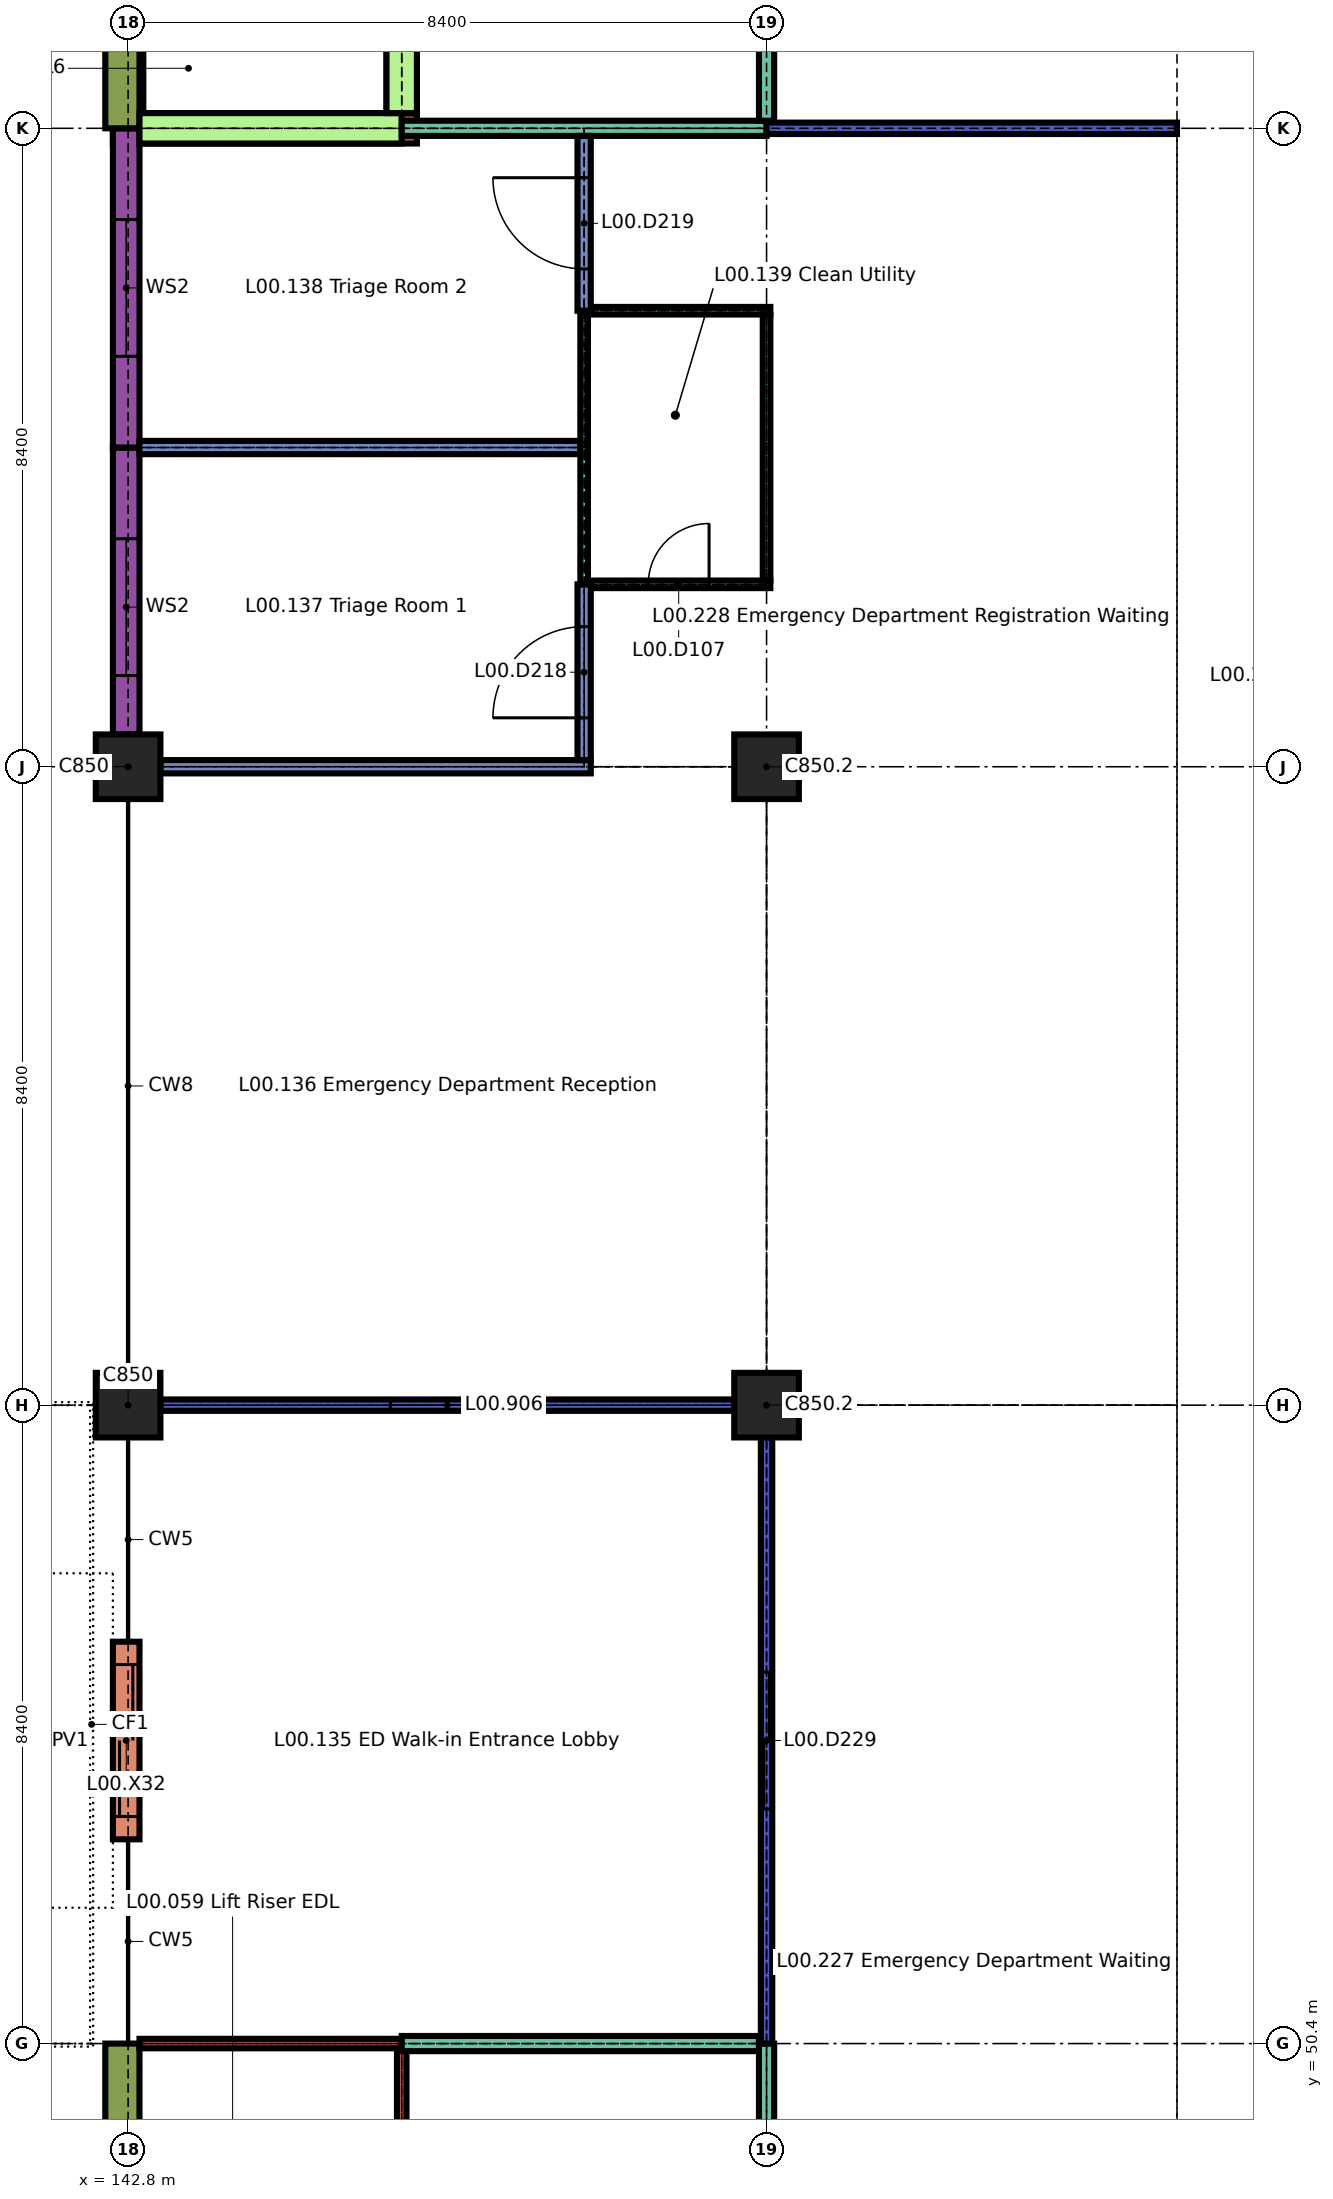
"""IFC4 building model, lengths in metres.
Left out: names, types, materials, properties, quantities, classifications, styles, units other than length and angle.
Written with IfcOpenShell. Run it as: python <this file> out.ifc"""

import sys

from ifc_helpers import new_model, si_unit, direction, frame, frame_2d, origin, origin_2d, place, context, subcontext, project, spatial, rectangle, extrude, element, fill, save


model = new_model("IFC4")
c1 = context("Model", 3, precision=1e-05, world=origin(), true_north=direction((0.0, 1.0)))
c2 = subcontext(c1, "Body", "Model", "MODEL_VIEW")
j1 = project(units=[si_unit("LENGTHUNIT", "METRE"), si_unit("PLANEANGLEUNIT", "RADIAN")], contexts=[c1])
p1 = place(None, origin())
s1 = spatial("IfcSite", under=j1, at=p1, CompositionType="ELEMENT")
p2 = place(p1, origin())
s2 = spatial("IfcBuilding", under=s1, at=p2, CompositionType="ELEMENT")
p3 = place(p2, origin())
s3 = spatial("IfcBuildingStorey", under=s2, at=p3, CompositionType="ELEMENT", Elevation=0.0)
p4 = place(p3, frame((142.6, 75.6, -1.4), z_axis=(0.0, 0.0, 1.0), x_axis=(1.0, 0.0, 0.0)))
e1 = element("IfcWall", 1, at=p4, inside=s3, PredefinedType="SOLIDWALL", context=c2, shape_type="SweptSolid", body=[
    extrude(rectangle(XDim=4.0, YDim=0.4, at=frame_2d((2.0, 0.0))), origin(), (0.0, 0.0, 1.0), 0.95),
])
for number, where, z_axis, x_axis in (
    (2, (142.8, 75.8, -1.4), (0.0, 0.0, 1.0), (0.0, 1.0, 0.0)),
    (3, (146.4, 75.8, -1.4), (0.0, 0.0, 1.0), (0.0, 1.0, 0.0)),
):
    element("IfcWall", number, at=place(p3, frame(where, z_axis=z_axis, x_axis=x_axis)), inside=s3, PredefinedType="SOLIDWALL", context=c2, shape_type="SweptSolid", body=[
        extrude(rectangle(XDim=8.0, YDim=0.4, at=frame_2d((4.0, 0.0))), origin(), (0.0, 0.0, 1.0), 0.95),
    ])
for number, where, z_axis, x_axis in (
    (4, (142.8, 58.8, 0.0), (0.0, 0.0, 1.0), (1.0, 0.0, 0.0)),
    (5, (151.2, 58.8, 0.0), (0.0, 0.0, 1.0), (1.0, 0.0, 0.0)),
    (6, (142.8, 67.2, 0.0), (0.0, 0.0, 1.0), (1.0, 0.0, 0.0)),
    (7, (151.2, 67.2, 0.0), (0.0, 0.0, 1.0), (1.0, 0.0, 0.0)),
):
    element("IfcColumn", number, at=place(p3, frame(where, z_axis=z_axis, x_axis=x_axis)), inside=s3, PredefinedType="COLUMN", context=c2, shape_type="SweptSolid", body=[
        extrude(rectangle(XDim=0.85, YDim=0.85, at=origin_2d()), origin(), (0.0, 0.0, 1.0), 4.14),
    ])
p5 = place(p3, frame((142.725, 46.2, 0.0), z_axis=(0.0, 0.0, 1.0), x_axis=(0.0, 1.0, 0.0)))
e8 = element("IfcWall", 8, at=p5, inside=s3, PredefinedType="SOLIDWALL", context=c2, shape_type="SweptSolid", body=[
    extrude(rectangle(XDim=4.2, YDim=0.45, at=frame_2d((2.1, 0.0))), origin(), (0.0, 0.0, 1.0), 4.14),
])
p6 = place(p3, frame((142.775, 53.087, 0.0), z_axis=(0.0, 0.0, 1.0), x_axis=(0.0, 1.0, 0.0)))
e9 = element("IfcWall", 9, at=p6, inside=s3, PredefinedType="SOLIDWALL", context=c2, shape_type="SweptSolid", body=[
    extrude(rectangle(XDim=2.6, YDim=0.35, at=frame_2d((1.3, 0.0))), origin(), (0.0, 0.0, 1.0), 4.14),
])
p7 = place(p6, frame((0.3, 0.0, 0.0)))
e10 = element("IfcOpeningElement", 10, at=p7, cuts=e9, PredefinedType="OPENING", context=c2, shape_type="SweptSolid", body=[
    extrude(rectangle(XDim=2.0, YDim=3.0, at=frame_2d((1.0, 1.5))), frame((0.0, 0.185, 0.0), z_axis=(0.0, -1.0, 0.0), x_axis=(1.0, 0.0, 0.0)), (0.0, 0.0, 1.0), 0.37),
])
p8 = place(p3, frame((142.775, 67.625, 0.0), z_axis=(0.0, 0.0, 1.0), x_axis=(0.0, 1.0, 0.0)))
e11 = element("IfcWall", 11, at=p8, inside=s3, PredefinedType="SOLIDWALL", context=c2, shape_type="SweptSolid", body=[
    extrude(rectangle(XDim=3.775, YDim=0.35, at=frame_2d((1.887, 0.0))), origin(), (0.0, 0.0, 1.0), 3.84),
])
p9 = place(p8, frame((0.775, 0.0, 0.9)))
e12 = element("IfcOpeningElement", 12, at=p9, cuts=e11, PredefinedType="OPENING", context=c2, shape_type="SweptSolid", body=[
    extrude(rectangle(XDim=1.8, YDim=2.1, at=frame_2d((0.9, 1.05))), frame((0.0, 0.185, 0.0), z_axis=(0.0, -1.0, 0.0), x_axis=(1.0, 0.0, 0.0)), (0.0, 0.0, 1.0), 0.37),
])
p10 = place(p3, frame((142.775, 71.4, 0.0), z_axis=(0.0, 0.0, 1.0), x_axis=(0.0, 1.0, 0.0)))
e13 = element("IfcWall", 13, at=p10, inside=s3, PredefinedType="SOLIDWALL", context=c2, shape_type="SweptSolid", body=[
    extrude(rectangle(XDim=4.2, YDim=0.35, at=frame_2d((2.1, 0.0))), origin(), (0.0, 0.0, 1.0), 3.84),
])
p11 = place(p10, frame((1.2, 0.0, 0.9)))
e14 = element("IfcOpeningElement", 14, at=p11, cuts=e13, PredefinedType="OPENING", context=c2, shape_type="SweptSolid", body=[
    extrude(rectangle(XDim=1.8, YDim=2.1, at=frame_2d((0.9, 1.05))), frame((0.0, 0.185, 0.0), z_axis=(0.0, -1.0, 0.0), x_axis=(1.0, 0.0, 0.0)), (0.0, 0.0, 1.0), 0.37),
])
p12 = place(p3, frame((142.725, 75.6, 0.0), z_axis=(0.0, 0.0, 1.0), x_axis=(0.0, 1.0, 0.0)))
e15 = element("IfcWall", 15, at=p12, inside=s3, PredefinedType="SOLIDWALL", context=c2, shape_type="SweptSolid", body=[
    extrude(rectangle(XDim=4.2, YDim=0.45, at=frame_2d((2.1, 0.0))), origin(), (0.0, 0.0, 1.0), 4.14),
])
p13 = place(p3, frame((142.95, 50.4, 0.0), z_axis=(0.0, 0.0, 1.0), x_axis=(1.0, 0.0, 0.0)))
e16 = element("IfcWall", 16, at=p13, inside=s3, PredefinedType="SOLIDWALL", context=c2, shape_type="SweptSolid", body=[
    extrude(rectangle(XDim=3.45, YDim=0.125, at=frame_2d((1.725, 0.0))), origin(), (0.0, 0.0, 1.0), 4.14),
])
p14 = place(p3, frame((146.4, 50.4, 0.0), z_axis=(0.0, 0.0, 1.0), x_axis=(1.0, 0.0, 0.0)))
e17 = element("IfcWall", 17, at=p14, inside=s3, PredefinedType="PARTITIONING", context=c2, shape_type="SweptSolid", body=[
    extrude(rectangle(XDim=4.7, YDim=0.2, at=frame_2d((2.35, 0.0))), origin(), (0.0, 0.0, 1.0), 4.14),
])
p15 = place(p3, frame((143.225, 58.8, 0.0), z_axis=(0.0, 0.0, 1.0), x_axis=(1.0, 0.0, 0.0)))
e18 = element("IfcWall", 18, at=p15, inside=s3, PredefinedType="PARTITIONING", context=c2, shape_type="SweptSolid", body=[
    extrude(rectangle(XDim=7.55, YDim=0.15, at=frame_2d((3.775, 0.0))), origin(), (0.0, 0.0, 1.0), 4.14),
])
p16 = place(p15, frame((3.025, 0.0, 0.9)))
e19 = element("IfcOpeningElement", 19, at=p16, cuts=e18, PredefinedType="OPENING", context=c2, shape_type="SweptSolid", body=[
    extrude(rectangle(XDim=1.5, YDim=1.0, at=frame_2d((0.75, 0.5))), frame((0.0, 0.085, 0.0), z_axis=(0.0, -1.0, 0.0), x_axis=(1.0, 0.0, 0.0)), (0.0, 0.0, 1.0), 0.17),
])
p17 = place(p3, frame((143.225, 67.2, 0.0), z_axis=(0.0, 0.0, 1.0), x_axis=(1.0, 0.0, 0.0)))
e20 = element("IfcWall", 20, at=p17, inside=s3, PredefinedType="PARTITIONING", context=c2, shape_type="SweptSolid", body=[
    extrude(rectangle(XDim=5.662, YDim=0.175, at=frame_2d((2.831, 0.0))), origin(), (0.0, 0.0, 1.0), 4.14),
])
p18 = place(p3, frame((148.887, 69.6, 0.0), z_axis=(0.0, 0.0, 1.0), x_axis=(1.0, 0.0, 0.0)))
e21 = element("IfcWall", 21, at=p18, inside=s3, PredefinedType="PARTITIONING", context=c2, shape_type="SweptSolid", body=[
    extrude(rectangle(XDim=2.363, YDim=0.1, at=frame_2d((1.181, 0.0))), origin(), (0.0, 0.0, 1.0), 4.14),
])
p19 = place(p18, frame((0.756, 0.0, 0.0)))
e22 = element("IfcOpeningElement", 22, at=p19, cuts=e21, PredefinedType="OPENING", context=c2, shape_type="SweptSolid", body=[
    extrude(rectangle(XDim=0.8, YDim=2.1, at=frame_2d((0.4, 1.05))), frame((0.0, 0.06, 0.0), z_axis=(0.0, -1.0, 0.0), x_axis=(1.0, 0.0, 0.0)), (0.0, 0.0, 1.0), 0.12),
])
p20 = place(p3, frame((142.95, 71.4, 0.0), z_axis=(0.0, 0.0, 1.0), x_axis=(1.0, 0.0, 0.0)))
e23 = element("IfcWall", 23, at=p20, inside=s3, PredefinedType="PARTITIONING", context=c2, shape_type="SweptSolid", body=[
    extrude(rectangle(XDim=5.8, YDim=0.175, at=frame_2d((2.9, 0.0))), origin(), (0.0, 0.0, 1.0), 4.14),
])
p21 = place(p3, frame((148.887, 73.2, 0.0), z_axis=(0.0, 0.0, 1.0), x_axis=(1.0, 0.0, 0.0)))
e24 = element("IfcWall", 24, at=p21, inside=s3, PredefinedType="PARTITIONING", context=c2, shape_type="SweptSolid", body=[
    extrude(rectangle(XDim=2.363, YDim=0.1, at=frame_2d((1.181, 0.0))), origin(), (0.0, 0.0, 1.0), 4.14),
])
p22 = place(p3, frame((142.95, 75.6, 0.0), z_axis=(0.0, 0.0, 1.0), x_axis=(1.0, 0.0, 0.0)))
e25 = element("IfcWall", 25, at=p22, inside=s3, PredefinedType="SHEAR", context=c2, shape_type="SweptSolid", body=[
    extrude(rectangle(XDim=3.45, YDim=0.4, at=frame_2d((1.725, 0.0))), origin(), (0.0, 0.0, 1.0), 4.14),
])
p23 = place(p3, frame((146.4, 75.6, 0.0), z_axis=(0.0, 0.0, 1.0), x_axis=(1.0, 0.0, 0.0)))
e26 = element("IfcWall", 26, at=p23, inside=s3, PredefinedType="PARTITIONING", context=c2, shape_type="SweptSolid", body=[
    extrude(rectangle(XDim=4.8, YDim=0.2, at=frame_2d((2.4, 0.0))), origin(), (0.0, 0.0, 1.0), 4.14),
])
p24 = place(p3, frame((151.2, 75.6, 0.0), z_axis=(0.0, 0.0, 1.0), x_axis=(1.0, 0.0, 0.0)))
e27 = element("IfcWall", 27, at=p24, inside=s3, PredefinedType="PARTITIONING", context=c2, shape_type="SweptSolid", body=[
    extrude(rectangle(XDim=5.4, YDim=0.15, at=frame_2d((2.7, 0.0))), origin(), (0.0, 0.0, 1.0), 4.14),
])
p25 = place(p3, frame((146.4, 46.2, 0.0), z_axis=(0.0, 0.0, 1.0), x_axis=(0.0, 1.0, 0.0)))
e28 = element("IfcWall", 28, at=p25, inside=s3, PredefinedType="SOLIDWALL", context=c2, shape_type="SweptSolid", body=[
    extrude(rectangle(XDim=4.1, YDim=0.125, at=frame_2d((2.05, 0.0))), origin(), (0.0, 0.0, 1.0), 4.14),
])
p26 = place(p25, frame((1.65, 0.0, 0.0)))
e29 = element("IfcOpeningElement", 29, at=p26, cuts=e28, PredefinedType="OPENING", context=c2, shape_type="SweptSolid", body=[
    extrude(rectangle(XDim=0.8, YDim=2.1, at=frame_2d((0.4, 1.05))), frame((0.0, 0.073, 0.0), z_axis=(0.0, -1.0, 0.0), x_axis=(1.0, 0.0, 0.0)), (0.0, 0.0, 1.0), 0.145),
])
p27 = place(p3, frame((146.4, 75.8, 0.0), z_axis=(0.0, 0.0, 1.0), x_axis=(0.0, 1.0, 0.0)))
e30 = element("IfcWall", 30, at=p27, inside=s3, PredefinedType="SHEAR", context=c2, shape_type="SweptSolid", body=[
    extrude(rectangle(XDim=8.0, YDim=0.4, at=frame_2d((4.0, 0.0))), origin(), (0.0, 0.0, 1.0), 4.14),
])
p28 = place(p27, frame((1.35, 0.0, 0.0)))
e31 = element("IfcOpeningElement", 31, at=p28, cuts=e30, PredefinedType="OPENING", context=c2, shape_type="SweptSolid", body=[
    extrude(rectangle(XDim=1.3, YDim=2.1, at=frame_2d((0.65, 1.05))), frame((0.0, 0.21, 0.0), z_axis=(0.0, -1.0, 0.0), x_axis=(1.0, 0.0, 0.0)), (0.0, 0.0, 1.0), 0.42),
])
p29 = place(p27, frame((5.45, 0.0, 0.0)))
e32 = element("IfcOpeningElement", 32, at=p29, cuts=e30, PredefinedType="OPENING", context=c2, shape_type="SweptSolid", body=[
    extrude(rectangle(XDim=1.1, YDim=2.1, at=frame_2d((0.55, 1.05))), frame((0.0, 0.21, 0.0), z_axis=(0.0, -1.0, 0.0), x_axis=(1.0, 0.0, 0.0)), (0.0, 0.0, 1.0), 0.42),
])
p30 = place(p3, frame((148.8, 67.288, 0.0), z_axis=(0.0, 0.0, 1.0), x_axis=(0.0, 1.0, 0.0)))
e33 = element("IfcWall", 33, at=p30, inside=s3, PredefinedType="PARTITIONING", context=c2, shape_type="SweptSolid", body=[
    extrude(rectangle(XDim=2.312, YDim=0.175, at=frame_2d((1.156, 0.0))), origin(), (0.0, 0.0, 1.0), 4.14),
])
p31 = place(p30, frame((0.556, 0.0, 0.0)))
e34 = element("IfcOpeningElement", 34, at=p31, cuts=e33, PredefinedType="OPENING", context=c2, shape_type="SweptSolid", body=[
    extrude(rectangle(XDim=1.2, YDim=2.1, at=frame_2d((0.6, 1.05))), frame((0.0, 0.097, 0.0), z_axis=(0.0, -1.0, 0.0), x_axis=(1.0, 0.0, 0.0)), (0.0, 0.0, 1.0), 0.195),
])
p32 = place(p3, frame((148.8, 69.6, 0.0), z_axis=(0.0, 0.0, 1.0), x_axis=(0.0, 1.0, 0.0)))
e35 = element("IfcWall", 35, at=p32, inside=s3, PredefinedType="PARTITIONING", context=c2, shape_type="SweptSolid", body=[
    extrude(rectangle(XDim=3.6, YDim=0.1, at=frame_2d((1.8, 0.0))), origin(), (0.0, 0.0, 1.0), 4.14),
])
p33 = place(p3, frame((148.8, 73.2, 0.0), z_axis=(0.0, 0.0, 1.0), x_axis=(0.0, 1.0, 0.0)))
e36 = element("IfcWall", 36, at=p33, inside=s3, PredefinedType="PARTITIONING", context=c2, shape_type="SweptSolid", body=[
    extrude(rectangle(XDim=2.3, YDim=0.175, at=frame_2d((1.15, 0.0))), origin(), (0.0, 0.0, 1.0), 4.14),
])
p34 = place(p33, frame((0.55, 0.0, 0.0)))
e37 = element("IfcOpeningElement", 37, at=p34, cuts=e36, PredefinedType="OPENING", context=c2, shape_type="SweptSolid", body=[
    extrude(rectangle(XDim=1.2, YDim=2.1, at=frame_2d((0.6, 1.05))), frame((0.0, 0.097, 0.0), z_axis=(0.0, -1.0, 0.0), x_axis=(1.0, 0.0, 0.0)), (0.0, 0.0, 1.0), 0.195),
])
p35 = place(p3, frame((151.2, 42.0, 0.0), z_axis=(0.0, 0.0, 1.0), x_axis=(0.0, 1.0, 0.0)))
e38 = element("IfcWall", 38, at=p35, inside=s3, PredefinedType="PARTITIONING", context=c2, shape_type="SweptSolid", body=[
    extrude(rectangle(XDim=8.4, YDim=0.2, at=frame_2d((4.2, 0.0))), origin(), (0.0, 0.0, 1.0), 4.14),
])
p36 = place(p35, frame((3.35, 0.0, 0.0)))
e39 = element("IfcOpeningElement", 39, at=p36, cuts=e38, PredefinedType="OPENING", context=c2, shape_type="SweptSolid", body=[
    extrude(rectangle(XDim=1.7, YDim=2.4, at=frame_2d((0.85, 1.2))), frame((0.0, 0.11, 0.0), z_axis=(0.0, -1.0, 0.0), x_axis=(1.0, 0.0, 0.0)), (0.0, 0.0, 1.0), 0.22),
])
p37 = place(p3, frame((151.2, 50.4, 0.0), z_axis=(0.0, 0.0, 1.0), x_axis=(0.0, 1.0, 0.0)))
e40 = element("IfcWall", 40, at=p37, inside=s3, PredefinedType="PARTITIONING", context=c2, shape_type="SweptSolid", body=[
    extrude(rectangle(XDim=7.975, YDim=0.15, at=frame_2d((3.988, 0.0))), origin(), (0.0, 0.0, 1.0), 4.14),
])
p38 = place(p37, frame((3.087, 0.0, 0.0)))
e41 = element("IfcOpeningElement", 41, at=p38, cuts=e40, PredefinedType="OPENING", context=c2, shape_type="SweptSolid", body=[
    extrude(rectangle(XDim=1.8, YDim=2.4, at=frame_2d((0.9, 1.2))), frame((0.0, 0.085, 0.0), z_axis=(0.0, -1.0, 0.0), x_axis=(1.0, 0.0, 0.0)), (0.0, 0.0, 1.0), 0.17),
])
p39 = place(p3, frame((151.2, 69.65, 0.0), z_axis=(0.0, 0.0, 1.0), x_axis=(0.0, 1.0, 0.0)))
e42 = element("IfcWall", 42, at=p39, inside=s3, PredefinedType="PARTITIONING", context=c2, shape_type="SweptSolid", body=[
    extrude(rectangle(XDim=3.5, YDim=0.1, at=frame_2d((1.75, 0.0))), origin(), (0.0, 0.0, 1.0), 4.14),
])
p40 = place(p3, frame((151.2, 75.7, 0.0), z_axis=(0.0, 0.0, 1.0), x_axis=(0.0, 1.0, 0.0)))
e43 = element("IfcWall", 43, at=p40, inside=s3, PredefinedType="PARTITIONING", context=c2, shape_type="SweptSolid", body=[
    extrude(rectangle(XDim=8.2, YDim=0.2, at=frame_2d((4.1, 0.0))), origin(), (0.0, 0.0, 1.0), 4.14),
])
p41 = place(p7, origin())
e44 = element("IfcDoor", 44, at=p41, inside=s3, OperationType="DOUBLE_DOOR_SLIDING", PredefinedType="DOOR", context=c2, shape_type="SweptSolid", body=[
    extrude(rectangle(XDim=2.0, YDim=3.0, at=frame_2d((1.0, 1.5))), frame((0.0, 0.06, 0.0), z_axis=(0.0, -1.0, 0.0), x_axis=(1.0, 0.0, 0.0)), (0.0, 0.0, 1.0), 0.12),
])
fill(e10, e44)
p42 = place(p9, origin())
e45 = element("IfcWindow", 45, at=p42, inside=s3, PartitioningType="SINGLE_PANEL", PredefinedType="WINDOW", context=c2, shape_type="SweptSolid", body=[
    extrude(rectangle(XDim=1.8, YDim=2.1, at=frame_2d((0.9, 1.05))), frame((0.0, 0.045, 0.0), z_axis=(0.0, -1.0, 0.0), x_axis=(1.0, 0.0, 0.0)), (0.0, 0.0, 1.0), 0.09),
])
fill(e12, e45)
p43 = place(p11, origin())
e46 = element("IfcWindow", 46, at=p43, inside=s3, PartitioningType="SINGLE_PANEL", PredefinedType="WINDOW", context=c2, shape_type="SweptSolid", body=[
    extrude(rectangle(XDim=1.8, YDim=2.1, at=frame_2d((0.9, 1.05))), frame((0.0, 0.045, 0.0), z_axis=(0.0, -1.0, 0.0), x_axis=(1.0, 0.0, 0.0)), (0.0, 0.0, 1.0), 0.09),
])
fill(e14, e46)
p44 = place(p19, origin())
e47 = element("IfcDoor", 47, at=p44, inside=s3, OperationType="SINGLE_SWING_LEFT", PredefinedType="DOOR", context=c2, shape_type="SweptSolid", body=[
    extrude(rectangle(XDim=0.8, YDim=2.1, at=frame_2d((0.4, 1.05))), frame((0.0, 0.02, 0.0), z_axis=(0.0, -1.0, 0.0), x_axis=(1.0, 0.0, 0.0)), (0.0, 0.0, 1.0), 0.04),
])
fill(e22, e47)
p45 = place(p31, origin())
e48 = element("IfcDoor", 48, at=p45, inside=s3, OperationType="SINGLE_SWING_RIGHT", PredefinedType="DOOR", context=c2, shape_type="SweptSolid", body=[
    extrude(rectangle(XDim=1.2, YDim=2.1, at=frame_2d((0.6, 1.05))), frame((0.0, 0.035, 0.0), z_axis=(0.0, -1.0, 0.0), x_axis=(1.0, 0.0, 0.0)), (0.0, 0.0, 1.0), 0.07),
])
fill(e34, e48)
p46 = place(p34, origin())
e49 = element("IfcDoor", 49, at=p46, inside=s3, OperationType="SINGLE_SWING_LEFT", PredefinedType="DOOR", context=c2, shape_type="SweptSolid", body=[
    extrude(rectangle(XDim=1.2, YDim=2.1, at=frame_2d((0.6, 1.05))), frame((0.0, 0.035, 0.0), z_axis=(0.0, -1.0, 0.0), x_axis=(1.0, 0.0, 0.0)), (0.0, 0.0, 1.0), 0.07),
])
fill(e37, e49)
p47 = place(p38, origin())
e50 = element("IfcDoor", 50, at=p47, inside=s3, OperationType="DOUBLE_DOOR_SLIDING", PredefinedType="DOOR", context=c2, shape_type="SweptSolid", body=[
    extrude(rectangle(XDim=1.8, YDim=2.4, at=frame_2d((0.9, 1.2))), frame((0.0, 0.025, 0.0), z_axis=(0.0, -1.0, 0.0), x_axis=(1.0, 0.0, 0.0)), (0.0, 0.0, 1.0), 0.05),
])
fill(e41, e50)
p48 = place(p16, origin())
e51 = element("IfcWindow", 51, at=p48, inside=s3, PartitioningType="DOUBLE_PANEL_HORIZONTAL", PredefinedType="WINDOW", context=c2, shape_type="SweptSolid", body=[
    extrude(rectangle(XDim=1.5, YDim=1.0, at=frame_2d((0.75, 0.5))), frame((0.0, 0.025, 0.0), z_axis=(0.0, -1.0, 0.0), x_axis=(1.0, 0.0, 0.0)), (0.0, 0.0, 1.0), 0.05),
])
fill(e19, e51)
save(model, sys.argv[1])
